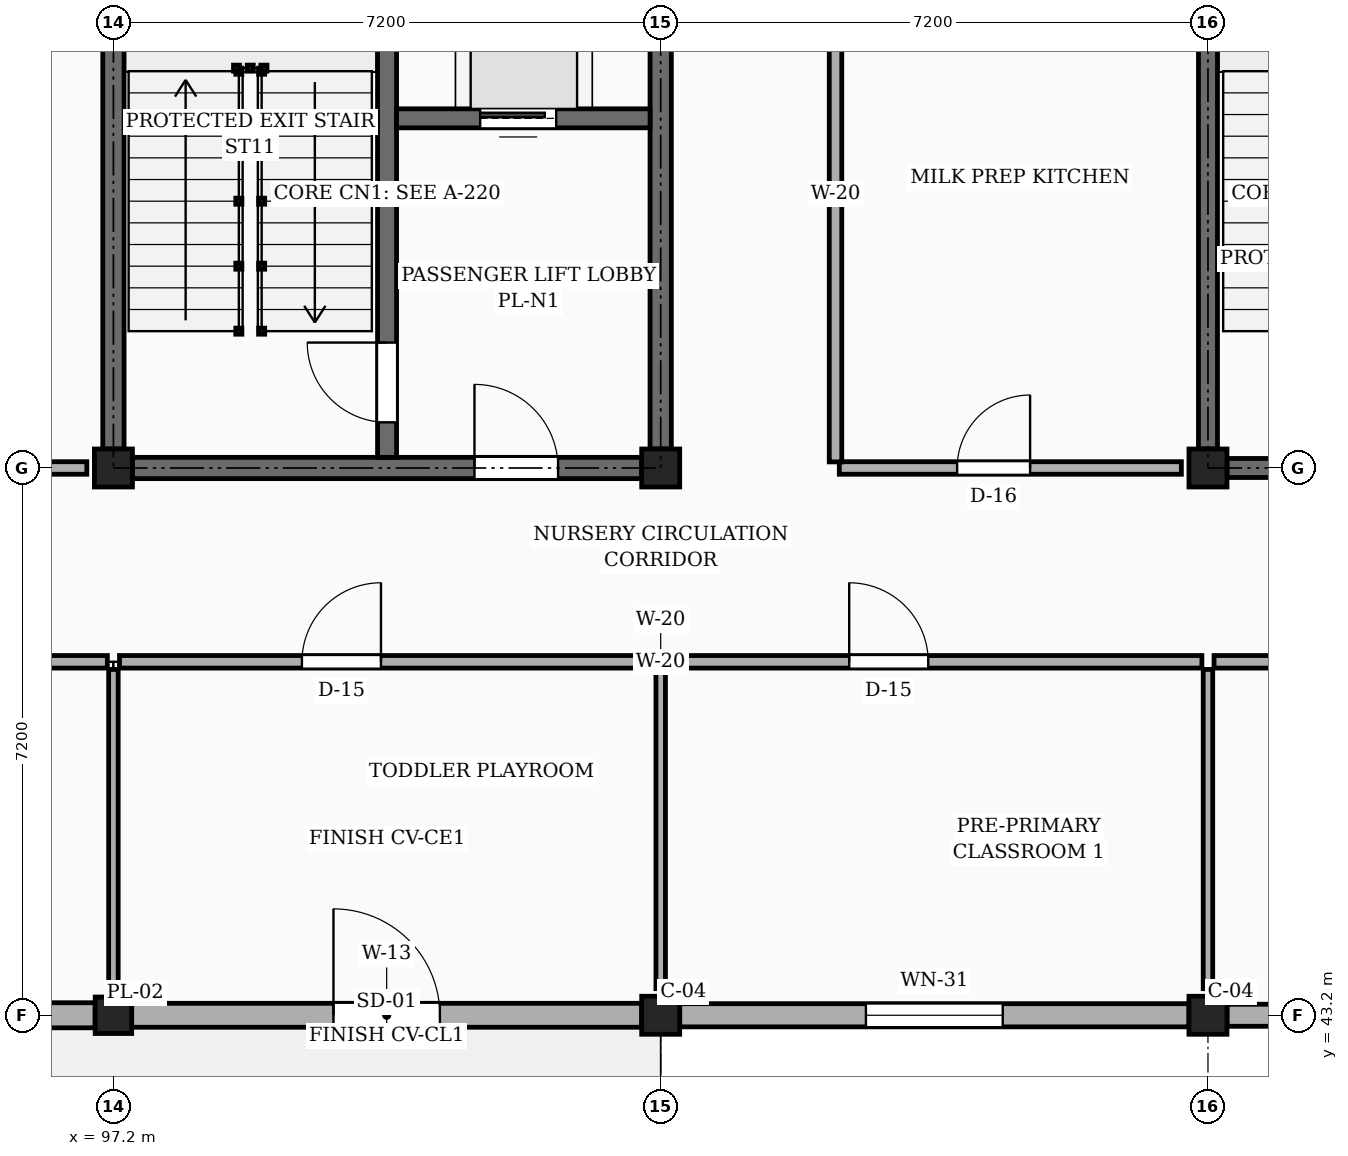
"""IFC4 building model, lengths in metres.
Left out: names, types, materials, properties, quantities, classifications, styles, units other than length and angle.
Written with IfcOpenShell. Run it as: python <this file> out.ifc"""

import sys

from ifc_helpers import new_model, si_unit, direction, frame, frame_2d, origin, origin_2d, place, context, subcontext, project, spatial, rectangle, extrude, element, fill, save


model = new_model("IFC4")
c1 = context("Model", 3, precision=1e-05, world=origin(), true_north=direction((0.0, 1.0)))
c2 = subcontext(c1, "Body", "Model", "MODEL_VIEW")
j1 = project(units=[si_unit("LENGTHUNIT", "METRE"), si_unit("PLANEANGLEUNIT", "RADIAN")], contexts=[c1])
p1 = place(None, origin())
s1 = spatial("IfcSite", under=j1, at=p1, CompositionType="ELEMENT")
p2 = place(p1, origin())
s2 = spatial("IfcBuilding", under=s1, at=p2, CompositionType="ELEMENT")
p3 = place(p2, origin())
s3 = spatial("IfcBuildingStorey", under=s2, at=p3, CompositionType="ELEMENT", Elevation=0.0)
p4 = place(p3, frame((97.2, 43.2, 0.0), z_axis=(0.0, 0.0, 1.0), x_axis=(1.0, 0.0, 0.0)))
e1 = element("IfcColumn", 1, at=p4, inside=s3, PredefinedType="PILASTER", context=c2, shape_type="SweptSolid", body=[
    extrude(rectangle(XDim=0.48, YDim=0.48, at=origin_2d()), origin(), (0.0, 0.0, 1.0), 4.5),
])
for number, where, z_axis, x_axis in (
    (2, (97.2, 50.4, 0.0), (0.0, 0.0, 1.0), (1.0, 0.0, 0.0)),
    (3, (104.4, 43.2, 0.0), (0.0, 0.0, 1.0), (1.0, 0.0, 0.0)),
    (4, (104.4, 50.4, 0.0), (0.0, 0.0, 1.0), (1.0, 0.0, 0.0)),
    (5, (111.6, 43.2, 0.0), (0.0, 0.0, 1.0), (1.0, 0.0, 0.0)),
    (6, (111.6, 50.4, 0.0), (0.0, 0.0, 1.0), (1.0, 0.0, 0.0)),
):
    element("IfcColumn", number, at=place(p3, frame(where, z_axis=z_axis, x_axis=x_axis)), inside=s3, PredefinedType="COLUMN", context=c2, shape_type="SweptSolid", body=[
        extrude(rectangle(XDim=0.5, YDim=0.5, at=origin_2d()), origin(), (0.0, 0.0, 1.0), 4.5),
    ])
p5 = place(p3, frame((90.25, 43.2, 0.0), z_axis=(0.0, 0.0, 1.0), x_axis=(1.0, 0.0, 0.0)))
e7 = element("IfcWall", 7, at=p5, inside=s3, PredefinedType="SOLIDWALL", context=c2, shape_type="SweptSolid", body=[
    extrude(rectangle(XDim=6.71, YDim=0.33, at=frame_2d((3.355, 0.0))), origin(), (0.0, 0.0, 1.0), 3.83),
])
p6 = place(p5, frame((2.505, 0.0, 0.0)))
e8 = element("IfcOpeningElement", 8, at=p6, cuts=e7, PredefinedType="OPENING", context=c2, shape_type="SweptSolid", body=[
    extrude(rectangle(XDim=1.7, YDim=2.25, at=frame_2d((0.85, 1.125))), frame((0.0, 0.175, 0.0), z_axis=(0.0, -1.0, 0.0), x_axis=(1.0, 0.0, 0.0)), (0.0, 0.0, 1.0), 0.35),
])
p7 = place(p3, frame((97.44, 43.2, 0.0), z_axis=(0.0, 0.0, 1.0), x_axis=(1.0, 0.0, 0.0)))
e9 = element("IfcWall", 9, at=p7, inside=s3, PredefinedType="SOLIDWALL", context=c2, shape_type="SweptSolid", body=[
    extrude(rectangle(XDim=6.71, YDim=0.315, at=frame_2d((3.355, 0.0))), origin(), (0.0, 0.0, 1.0), 3.83),
])
p8 = place(p7, frame((2.655, 0.0, 0.0)))
e10 = element("IfcOpeningElement", 10, at=p8, cuts=e9, PredefinedType="OPENING", context=c2, shape_type="SweptSolid", body=[
    extrude(rectangle(XDim=1.4, YDim=2.2, at=frame_2d((0.7, 1.1))), frame((0.0, 0.167, 0.0), z_axis=(0.0, -1.0, 0.0), x_axis=(1.0, 0.0, 0.0)), (0.0, 0.0, 1.0), 0.335),
])
p9 = place(p3, frame((104.65, 43.2, 0.0), z_axis=(0.0, 0.0, 1.0), x_axis=(1.0, 0.0, 0.0)))
e11 = element("IfcWall", 11, at=p9, inside=s3, PredefinedType="SOLIDWALL", context=c2, shape_type="SweptSolid", body=[
    extrude(rectangle(XDim=6.7, YDim=0.305, at=frame_2d((3.35, 0.0))), origin(), (0.0, 0.0, 1.0), 3.83),
])
p10 = place(p9, frame((2.45, 0.0, 0.85)))
e12 = element("IfcOpeningElement", 12, at=p10, cuts=e11, PredefinedType="OPENING", context=c2, shape_type="SweptSolid", body=[
    extrude(rectangle(XDim=1.8, YDim=2.1, at=frame_2d((0.9, 1.05))), frame((0.0, 0.163, 0.0), z_axis=(0.0, -1.0, 0.0), x_axis=(1.0, 0.0, 0.0)), (0.0, 0.0, 1.0), 0.325),
])
p11 = place(p3, frame((111.85, 43.2, 0.0), z_axis=(0.0, 0.0, 1.0), x_axis=(1.0, 0.0, 0.0)))
e13 = element("IfcWall", 13, at=p11, inside=s3, PredefinedType="SOLIDWALL", context=c2, shape_type="SweptSolid", body=[
    extrude(rectangle(XDim=6.71, YDim=0.29, at=frame_2d((3.355, 0.0))), origin(), (0.0, 0.0, 1.0), 3.83),
])
p12 = place(p11, frame((2.305, 0.0, 0.85)))
e14 = element("IfcOpeningElement", 14, at=p12, cuts=e13, PredefinedType="OPENING", context=c2, shape_type="SweptSolid", body=[
    extrude(rectangle(XDim=2.1, YDim=2.1, at=frame_2d((1.05, 1.05))), frame((0.0, 0.155, 0.0), z_axis=(0.0, -1.0, 0.0), x_axis=(1.0, 0.0, 0.0)), (0.0, 0.0, 1.0), 0.31),
])
for number, where, z_axis, x_axis in (
    (15, (97.2, 50.65, 0.0), (0.0, 0.0, 1.0), (0.0, 1.0, 0.0)),
    (16, (104.4, 50.65, 0.0), (0.0, 0.0, 1.0), (0.0, 1.0, 0.0)),
):
    element("IfcWall", number, at=place(p3, frame(where, z_axis=z_axis, x_axis=x_axis)), inside=s3, PredefinedType="SHEAR", context=c2, shape_type="SweptSolid", body=[
        extrude(rectangle(XDim=6.7, YDim=0.28, at=frame_2d((3.35, 0.0))), origin(), (0.0, 0.0, 1.0), 4.26),
    ])
p13 = place(p3, frame((97.45, 50.4, 0.0), z_axis=(0.0, 0.0, 1.0), x_axis=(1.0, 0.0, 0.0)))
e17 = element("IfcWall", 17, at=p13, inside=s3, PredefinedType="SHEAR", context=c2, shape_type="SweptSolid", body=[
    extrude(rectangle(XDim=6.7, YDim=0.28, at=frame_2d((3.35, 0.0))), origin(), (0.0, 0.0, 1.0), 4.26),
])
p14 = place(p13, frame((4.5, 0.0, 0.0)))
e18 = element("IfcOpeningElement", 18, at=p14, cuts=e17, PredefinedType="OPENING", context=c2, shape_type="SweptSolid", body=[
    extrude(rectangle(XDim=1.1, YDim=2.15, at=frame_2d((0.55, 1.075))), frame((0.0, 0.15, 0.0), z_axis=(0.0, -1.0, 0.0), x_axis=(1.0, 0.0, 0.0)), (0.0, 0.0, 1.0), 0.3),
])
p15 = place(p3, frame((100.8, 50.54, 0.0), z_axis=(0.0, 0.0, 1.0), x_axis=(0.0, 1.0, 0.0)))
e19 = element("IfcWall", 19, at=p15, inside=s3, PredefinedType="SHEAR", context=c2, shape_type="SweptSolid", body=[
    extrude(rectangle(XDim=6.92, YDim=0.25, at=frame_2d((3.46, 0.0))), origin(), (0.0, 0.0, 1.0), 4.26),
])
p16 = place(p15, frame((0.46, 0.0, 0.0)))
e20 = element("IfcOpeningElement", 20, at=p16, cuts=e19, PredefinedType="OPENING", context=c2, shape_type="SweptSolid", body=[
    extrude(rectangle(XDim=1.05, YDim=2.15, at=frame_2d((0.525, 1.075))), frame((0.0, 0.135, 0.0), z_axis=(0.0, -1.0, 0.0), x_axis=(1.0, 0.0, 0.0)), (0.0, 0.0, 1.0), 0.27),
])
p17 = place(p3, frame((100.925, 55.0, 0.0), z_axis=(0.0, 0.0, 1.0), x_axis=(1.0, 0.0, 0.0)))
e21 = element("IfcWall", 21, at=p17, inside=s3, PredefinedType="SHEAR", context=c2, shape_type="SweptSolid", body=[
    extrude(rectangle(XDim=3.335, YDim=0.25, at=frame_2d((1.667, 0.0))), origin(), (0.0, 0.0, 1.0), 4.26),
])
p18 = place(p17, frame((1.1, 0.0, 0.0)))
e22 = element("IfcOpeningElement", 22, at=p18, cuts=e21, PredefinedType="OPENING", context=c2, shape_type="SweptSolid", body=[
    extrude(rectangle(XDim=1.0, YDim=2.2, at=frame_2d((0.5, 1.1))), frame((0.0, 0.135, 0.0), z_axis=(0.0, -1.0, 0.0), x_axis=(1.0, 0.0, 0.0)), (0.0, 0.0, 1.0), 0.27),
])
p19 = place(p3, frame((111.6, 50.65, 0.0), z_axis=(0.0, 0.0, 1.0), x_axis=(0.0, 1.0, 0.0)))
e23 = element("IfcWall", 23, at=p19, inside=s3, PredefinedType="SHEAR", context=c2, shape_type="SweptSolid", body=[
    extrude(rectangle(XDim=6.7, YDim=0.25, at=frame_2d((3.35, 0.0))), origin(), (0.0, 0.0, 1.0), 4.26),
])
p20 = place(p3, frame((111.85, 50.4, 0.0), z_axis=(0.0, 0.0, 1.0), x_axis=(1.0, 0.0, 0.0)))
e24 = element("IfcWall", 24, at=p20, inside=s3, PredefinedType="SHEAR", context=c2, shape_type="SweptSolid", body=[
    extrude(rectangle(XDim=3.225, YDim=0.25, at=frame_2d((1.612, 0.0))), origin(), (0.0, 0.0, 1.0), 4.26),
])
p21 = place(p20, frame((1.0, 0.0, 0.0)))
e25 = element("IfcOpeningElement", 25, at=p21, cuts=e24, PredefinedType="OPENING", context=c2, shape_type="SweptSolid", body=[
    extrude(rectangle(XDim=1.05, YDim=2.15, at=frame_2d((0.525, 1.075))), frame((0.0, 0.135, 0.0), z_axis=(0.0, -1.0, 0.0), x_axis=(1.0, 0.0, 0.0)), (0.0, 0.0, 1.0), 0.27),
])
p22 = place(p3, frame((90.175, 47.85, 0.0), z_axis=(0.0, 0.0, 1.0), x_axis=(1.0, 0.0, 0.0)))
e26 = element("IfcWall", 26, at=p22, inside=s3, PredefinedType="PARTITIONING", context=c2, shape_type="SweptSolid", body=[
    extrude(rectangle(XDim=6.945, YDim=0.165, at=frame_2d((3.473, 0.0))), origin(), (0.0, 0.0, 1.0), 3.41),
])
p23 = place(p22, frame((2.4, 0.0, 0.0)))
e27 = element("IfcOpeningElement", 27, at=p23, cuts=e26, PredefinedType="OPENING", context=c2, shape_type="SweptSolid", body=[
    extrude(rectangle(XDim=1.04, YDim=2.12, at=frame_2d((0.52, 1.06))), frame((0.0, 0.093, 0.0), z_axis=(0.0, -1.0, 0.0), x_axis=(1.0, 0.0, 0.0)), (0.0, 0.0, 1.0), 0.185),
])
p24 = place(p3, frame((97.28, 47.85, 0.0), z_axis=(0.0, 0.0, 1.0), x_axis=(1.0, 0.0, 0.0)))
e28 = element("IfcWall", 28, at=p24, inside=s3, PredefinedType="PARTITIONING", context=c2, shape_type="SweptSolid", body=[
    extrude(rectangle(XDim=7.04, YDim=0.165, at=frame_2d((3.52, 0.0))), origin(), (0.0, 0.0, 1.0), 3.41),
])
p25 = place(p24, frame((2.4, 0.0, 0.0)))
e29 = element("IfcOpeningElement", 29, at=p25, cuts=e28, PredefinedType="OPENING", context=c2, shape_type="SweptSolid", body=[
    extrude(rectangle(XDim=1.04, YDim=2.12, at=frame_2d((0.52, 1.06))), frame((0.0, 0.093, 0.0), z_axis=(0.0, -1.0, 0.0), x_axis=(1.0, 0.0, 0.0)), (0.0, 0.0, 1.0), 0.185),
])
p26 = place(p3, frame((104.48, 47.85, 0.0), z_axis=(0.0, 0.0, 1.0), x_axis=(1.0, 0.0, 0.0)))
e30 = element("IfcWall", 30, at=p26, inside=s3, PredefinedType="PARTITIONING", context=c2, shape_type="SweptSolid", body=[
    extrude(rectangle(XDim=7.04, YDim=0.165, at=frame_2d((3.52, 0.0))), origin(), (0.0, 0.0, 1.0), 3.41),
])
p27 = place(p26, frame((2.4, 0.0, 0.0)))
e31 = element("IfcOpeningElement", 31, at=p27, cuts=e30, PredefinedType="OPENING", context=c2, shape_type="SweptSolid", body=[
    extrude(rectangle(XDim=1.04, YDim=2.12, at=frame_2d((0.52, 1.06))), frame((0.0, 0.093, 0.0), z_axis=(0.0, -1.0, 0.0), x_axis=(1.0, 0.0, 0.0)), (0.0, 0.0, 1.0), 0.185),
])
p28 = place(p3, frame((111.68, 47.85, 0.0), z_axis=(0.0, 0.0, 1.0), x_axis=(1.0, 0.0, 0.0)))
e32 = element("IfcWall", 32, at=p28, inside=s3, PredefinedType="PARTITIONING", context=c2, shape_type="SweptSolid", body=[
    extrude(rectangle(XDim=6.945, YDim=0.165, at=frame_2d((3.473, 0.0))), origin(), (0.0, 0.0, 1.0), 3.41),
])
p29 = place(p28, frame((2.4, 0.0, 0.0)))
e33 = element("IfcOpeningElement", 33, at=p29, cuts=e32, PredefinedType="OPENING", context=c2, shape_type="SweptSolid", body=[
    extrude(rectangle(XDim=1.04, YDim=2.12, at=frame_2d((0.52, 1.06))), frame((0.0, 0.093, 0.0), z_axis=(0.0, -1.0, 0.0), x_axis=(1.0, 0.0, 0.0)), (0.0, 0.0, 1.0), 0.185),
])
p30 = place(p3, frame((90.35, 50.4, 0.0), z_axis=(0.0, 0.0, 1.0), x_axis=(1.0, 0.0, 0.0)))
e34 = element("IfcWall", 34, at=p30, inside=s3, PredefinedType="PARTITIONING", context=c2, shape_type="SweptSolid", body=[
    extrude(rectangle(XDim=6.5, YDim=0.165, at=frame_2d((3.25, 0.0))), origin(), (0.0, 0.0, 1.0), 3.41),
])
p31 = place(p30, frame((2.4, 0.0, 0.0)))
e35 = element("IfcOpeningElement", 35, at=p31, cuts=e34, PredefinedType="OPENING", context=c2, shape_type="SweptSolid", body=[
    extrude(rectangle(XDim=0.96, YDim=2.1, at=frame_2d((0.48, 1.05))), frame((0.0, 0.093, 0.0), z_axis=(0.0, -1.0, 0.0), x_axis=(1.0, 0.0, 0.0)), (0.0, 0.0, 1.0), 0.185),
])
p32 = place(p3, frame((106.75, 50.4, 0.0), z_axis=(0.0, 0.0, 1.0), x_axis=(1.0, 0.0, 0.0)))
e36 = element("IfcWall", 36, at=p32, inside=s3, PredefinedType="PARTITIONING", context=c2, shape_type="SweptSolid", body=[
    extrude(rectangle(XDim=4.5, YDim=0.165, at=frame_2d((2.25, 0.0))), origin(), (0.0, 0.0, 1.0), 3.41),
])
p33 = place(p32, frame((1.55, 0.0, 0.0)))
e37 = element("IfcOpeningElement", 37, at=p33, cuts=e36, PredefinedType="OPENING", context=c2, shape_type="SweptSolid", body=[
    extrude(rectangle(XDim=0.96, YDim=2.1, at=frame_2d((0.48, 1.05))), frame((0.0, 0.093, 0.0), z_axis=(0.0, -1.0, 0.0), x_axis=(1.0, 0.0, 0.0)), (0.0, 0.0, 1.0), 0.185),
])
p34 = place(p3, frame((106.7, 50.48, 0.0), z_axis=(0.0, 0.0, 1.0), x_axis=(0.0, 1.0, 0.0)))
e38 = element("IfcWall", 38, at=p34, inside=s3, PredefinedType="PARTITIONING", context=c2, shape_type="SweptSolid", body=[
    extrude(rectangle(XDim=7.04, YDim=0.165, at=frame_2d((3.52, 0.0))), origin(), (0.0, 0.0, 1.0), 3.41),
])
for number, where, z_axis, x_axis in (
    (39, (97.2, 43.55, 0.0), (0.0, 0.0, 1.0), (0.0, 1.0, 0.0)),
    (40, (104.4, 43.55, 0.0), (0.0, 0.0, 1.0), (0.0, 1.0, 0.0)),
    (41, (111.6, 43.55, 0.0), (0.0, 0.0, 1.0), (0.0, 1.0, 0.0)),
):
    element("IfcWall", number, at=place(p3, frame(where, z_axis=z_axis, x_axis=x_axis)), inside=s3, PredefinedType="PARTITIONING", context=c2, shape_type="SweptSolid", body=[
        extrude(rectangle(XDim=4.2, YDim=0.125, at=frame_2d((2.1, 0.0))), origin(), (0.0, 0.0, 1.0), 3.41),
    ])
p35 = place(p8, frame((1.4, 0.0, 0.0), z_axis=(0.0, 0.0, 1.0), x_axis=(-1.0, 0.0, 0.0)))
e42 = element("IfcDoor", 42, at=p35, inside=s3, OperationType="SINGLE_SWING_LEFT", PredefinedType="DOOR", context=c2, shape_type="SweptSolid", body=[
    extrude(rectangle(XDim=1.4, YDim=2.2, at=frame_2d((0.7, 1.1))), frame((0.0, 0.025, 0.0), z_axis=(0.0, -1.0, 0.0), x_axis=(1.0, 0.0, 0.0)), (0.0, 0.0, 1.0), 0.05),
])
fill(e10, e42)
p36 = place(p10, origin())
e43 = element("IfcWindow", 43, at=p36, inside=s3, PartitioningType="SINGLE_PANEL", PredefinedType="WINDOW", context=c2, shape_type="SweptSolid", body=[
    extrude(rectangle(XDim=1.8, YDim=2.1, at=frame_2d((0.9, 1.05))), frame((0.0, 0.03, 0.0), z_axis=(0.0, -1.0, 0.0), x_axis=(1.0, 0.0, 0.0)), (0.0, 0.0, 1.0), 0.06),
])
fill(e12, e43)
p37 = place(p14, frame((1.1, 0.0, 0.0), z_axis=(0.0, 0.0, 1.0), x_axis=(-1.0, 0.0, 0.0)))
e44 = element("IfcDoor", 44, at=p37, inside=s3, OperationType="SINGLE_SWING_LEFT", PredefinedType="DOOR", context=c2, shape_type="SweptSolid", body=[
    extrude(rectangle(XDim=1.1, YDim=2.15, at=frame_2d((0.55, 1.075))), frame((0.0, 0.025, 0.0), z_axis=(0.0, -1.0, 0.0), x_axis=(1.0, 0.0, 0.0)), (0.0, 0.0, 1.0), 0.05),
])
fill(e18, e44)
p38 = place(p16, frame((1.05, 0.0, 0.0), z_axis=(0.0, 0.0, 1.0), x_axis=(-1.0, 0.0, 0.0)))
e45 = element("IfcDoor", 45, at=p38, inside=s3, OperationType="SINGLE_SWING_RIGHT", PredefinedType="DOOR", context=c2, shape_type="SweptSolid", body=[
    extrude(rectangle(XDim=1.05, YDim=2.15, at=frame_2d((0.525, 1.075))), frame((0.0, 0.025, 0.0), z_axis=(0.0, -1.0, 0.0), x_axis=(1.0, 0.0, 0.0)), (0.0, 0.0, 1.0), 0.05),
])
fill(e20, e45)
p39 = place(p18, origin())
e46 = element("IfcDoor", 46, at=p39, inside=s3, OperationType="SLIDING_TO_LEFT", PredefinedType="DOOR", context=c2, shape_type="SweptSolid", body=[
    extrude(rectangle(XDim=1.0, YDim=2.2, at=frame_2d((0.5, 1.1))), frame((0.0, 0.025, 0.0), z_axis=(0.0, -1.0, 0.0), x_axis=(1.0, 0.0, 0.0)), (0.0, 0.0, 1.0), 0.05),
])
fill(e22, e46)
p40 = place(p25, origin())
e47 = element("IfcDoor", 47, at=p40, inside=s3, OperationType="SINGLE_SWING_RIGHT", PredefinedType="DOOR", context=c2, shape_type="SweptSolid", body=[
    extrude(rectangle(XDim=1.04, YDim=2.12, at=frame_2d((0.52, 1.06))), frame((0.0, 0.025, 0.0), z_axis=(0.0, -1.0, 0.0), x_axis=(1.0, 0.0, 0.0)), (0.0, 0.0, 1.0), 0.05),
])
fill(e29, e47)
p41 = place(p27, origin())
e48 = element("IfcDoor", 48, at=p41, inside=s3, OperationType="SINGLE_SWING_LEFT", PredefinedType="DOOR", context=c2, shape_type="SweptSolid", body=[
    extrude(rectangle(XDim=1.04, YDim=2.12, at=frame_2d((0.52, 1.06))), frame((0.0, 0.025, 0.0), z_axis=(0.0, -1.0, 0.0), x_axis=(1.0, 0.0, 0.0)), (0.0, 0.0, 1.0), 0.05),
])
fill(e31, e48)
p42 = place(p33, origin())
e49 = element("IfcDoor", 49, at=p42, inside=s3, OperationType="SINGLE_SWING_RIGHT", PredefinedType="DOOR", context=c2, shape_type="SweptSolid", body=[
    extrude(rectangle(XDim=0.96, YDim=2.1, at=frame_2d((0.48, 1.05))), frame((0.0, 0.025, 0.0), z_axis=(0.0, -1.0, 0.0), x_axis=(1.0, 0.0, 0.0)), (0.0, 0.0, 1.0), 0.05),
])
fill(e37, e49)
save(model, sys.argv[1])
